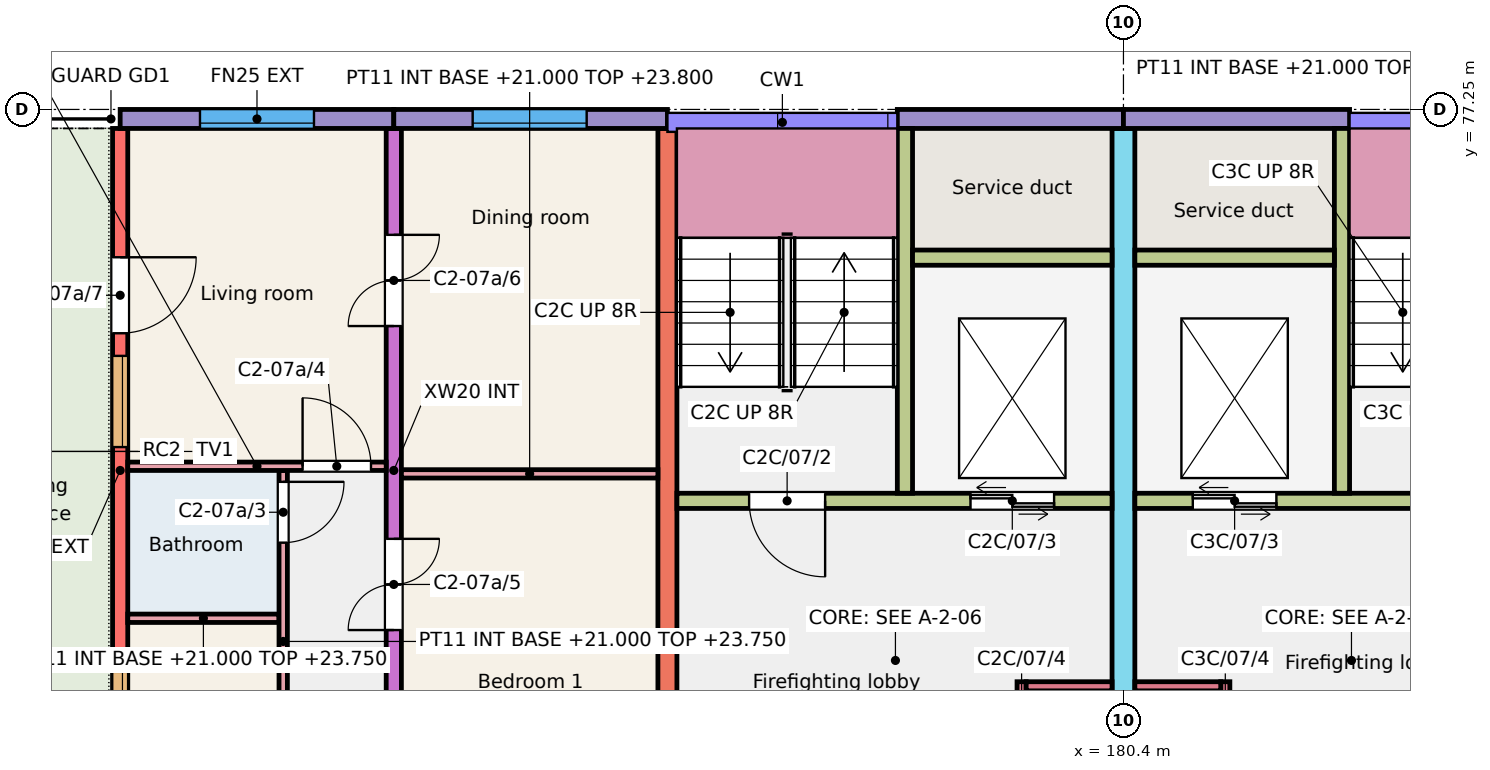
"""IFC4 building model, lengths in metres.
Left out: names, types, materials, properties, quantities, classifications, styles, units other than length and angle.
Written with IfcOpenShell. Run it as: python <this file> out.ifc"""

import sys

from ifc_helpers import new_model, si_unit, direction, frame, frame_2d, origin, place, context, subcontext, project, spatial, rectangle, extrude, element, fill, save


model = new_model("IFC4")
c1 = context("Model", 3, precision=1e-05, world=origin(), true_north=direction((0.0, 1.0)))
c2 = subcontext(c1, "Body", "Model", "MODEL_VIEW")
j1 = project(units=[si_unit("LENGTHUNIT", "METRE"), si_unit("PLANEANGLEUNIT", "RADIAN")], contexts=[c1])
p1 = place(None, origin())
s1 = spatial("IfcSite", under=j1, at=p1, CompositionType="ELEMENT")
p2 = place(p1, origin())
s2 = spatial("IfcBuilding", under=s1, at=p2, CompositionType="ELEMENT")
p3 = place(p2, frame((0.0, 0.0, 21.0)))
s3 = spatial("IfcBuildingStorey", under=s2, at=p3, CompositionType="ELEMENT", Elevation=21.0)
p4 = place(p3, frame((167.2, 68.0, 0.0), z_axis=(0.0, 0.0, 1.0), x_axis=(0.0, 1.0, 0.0)))
e1 = element("IfcWall", 1, at=p4, inside=s3, PredefinedType="SHEAR", context=c2, shape_type="SweptSolid", body=[
    extrude(rectangle(XDim=9.0, YDim=0.2, at=frame_2d((4.5, 0.0))), origin(), (0.0, 0.0, 1.0), 3.0),
])
p5 = place(p4, frame((0.65, 0.0, 0.9)))
e2 = element("IfcOpeningElement", 2, at=p5, cuts=e1, PredefinedType="OPENING", context=c2, shape_type="SweptSolid", body=[
    extrude(rectangle(XDim=1.2, YDim=1.5, at=frame_2d((0.6, 0.75))), frame((0.0, 0.11, 0.0), z_axis=(0.0, -1.0, 0.0), x_axis=(1.0, 0.0, 0.0)), (0.0, 0.0, 1.0), 0.22),
])
p6 = place(p4, frame((4.808, 0.0, 0.9)))
e3 = element("IfcOpeningElement", 3, at=p6, cuts=e1, PredefinedType="OPENING", context=c2, shape_type="SweptSolid", body=[
    extrude(rectangle(XDim=1.2, YDim=1.5, at=frame_2d((0.6, 0.75))), frame((0.0, 0.11, 0.0), z_axis=(0.0, -1.0, 0.0), x_axis=(1.0, 0.0, 0.0)), (0.0, 0.0, 1.0), 0.22),
])
p7 = place(p4, frame((6.305, 0.0, 0.0)))
e4 = element("IfcOpeningElement", 4, at=p7, cuts=e1, PredefinedType="OPENING", context=c2, shape_type="SweptSolid", body=[
    extrude(rectangle(XDim=1.0, YDim=2.1, at=frame_2d((0.5, 1.05))), frame((0.0, 0.11, 0.0), z_axis=(0.0, -1.0, 0.0), x_axis=(1.0, 0.0, 0.0)), (0.0, 0.0, 1.0), 0.22),
])
p8 = place(p3, frame((170.8, 68.0, 0.0), z_axis=(0.0, 0.0, 1.0), x_axis=(0.0, 1.0, 0.0)))
e5 = element("IfcWall", 5, at=p8, inside=s3, PredefinedType="SHEAR", context=c2, shape_type="SweptSolid", body=[
    extrude(rectangle(XDim=9.0, YDim=0.2, at=frame_2d((4.5, 0.0))), origin(), (0.0, 0.0, 1.0), 3.0),
])
p9 = place(p8, frame((2.4, 0.0, 0.0)))
e6 = element("IfcOpeningElement", 6, at=p9, cuts=e5, PredefinedType="OPENING", context=c2, shape_type="SweptSolid", body=[
    extrude(rectangle(XDim=1.2, YDim=2.1, at=frame_2d((0.6, 1.05))), frame((0.0, 0.11, 0.0), z_axis=(0.0, -1.0, 0.0), x_axis=(1.0, 0.0, 0.0)), (0.0, 0.0, 1.0), 0.22),
])
p10 = place(p8, frame((6.4, 0.0, 0.0)))
e7 = element("IfcOpeningElement", 7, at=p10, cuts=e5, PredefinedType="OPENING", context=c2, shape_type="SweptSolid", body=[
    extrude(rectangle(XDim=1.2, YDim=2.1, at=frame_2d((0.6, 1.05))), frame((0.0, 0.11, 0.0), z_axis=(0.0, -1.0, 0.0), x_axis=(1.0, 0.0, 0.0)), (0.0, 0.0, 1.0), 0.22),
])
p11 = place(p3, frame((174.4, 68.0, 0.0), z_axis=(0.0, 0.0, 1.0), x_axis=(0.0, 1.0, 0.0)))
e8 = element("IfcWall", 8, at=p11, inside=s3, PredefinedType="SHEAR", context=c2, shape_type="SweptSolid", body=[
    extrude(rectangle(XDim=9.0, YDim=0.25, at=frame_2d((4.5, 0.0))), origin(), (0.0, 0.0, 1.0), 3.0),
])
p12 = place(p3, frame((180.4, 66.0, 0.0), z_axis=(0.0, 0.0, 1.0), x_axis=(0.0, 1.0, 0.0)))
e9 = element("IfcWall", 9, at=p12, inside=s3, PredefinedType="SHEAR", context=c2, shape_type="SweptSolid", body=[
    extrude(rectangle(XDim=11.0, YDim=0.3, at=frame_2d((5.5, 0.0))), origin(), (0.0, 0.0, 1.0), 3.0),
])
p13 = place(p12, frame((0.3, 0.0, 0.0)))
e10 = element("IfcOpeningElement", 10, at=p13, cuts=e9, PredefinedType="OPENING", context=c2, shape_type="SweptSolid", body=[
    extrude(rectangle(XDim=1.2, YDim=2.1, at=frame_2d((0.6, 1.05))), frame((0.0, 0.16, 0.0), z_axis=(0.0, -1.0, 0.0), x_axis=(1.0, 0.0, 0.0)), (0.0, 0.0, 1.0), 0.32),
])
p14 = place(p3, frame((167.2, 77.125, 0.0), z_axis=(0.0, 0.0, 1.0), x_axis=(1.0, 0.0, 0.0)))
e11 = element("IfcWall", 11, at=p14, inside=s3, PredefinedType="SOLIDWALL", context=c2, shape_type="SweptSolid", body=[
    extrude(rectangle(XDim=3.6, YDim=0.25, at=frame_2d((1.8, 0.0))), origin(), (0.0, 0.0, 1.0), 3.0),
])
p15 = place(p14, frame((1.05, 0.0, 0.9)))
e12 = element("IfcOpeningElement", 12, at=p15, cuts=e11, PredefinedType="OPENING", context=c2, shape_type="SweptSolid", body=[
    extrude(rectangle(XDim=1.5, YDim=1.5, at=frame_2d((0.75, 0.75))), frame((0.0, 0.135, 0.0), z_axis=(0.0, -1.0, 0.0), x_axis=(1.0, 0.0, 0.0)), (0.0, 0.0, 1.0), 0.27),
])
p16 = place(p3, frame((170.8, 77.125, 0.0), z_axis=(0.0, 0.0, 1.0), x_axis=(1.0, 0.0, 0.0)))
e13 = element("IfcWall", 13, at=p16, inside=s3, PredefinedType="SOLIDWALL", context=c2, shape_type="SweptSolid", body=[
    extrude(rectangle(XDim=3.6, YDim=0.25, at=frame_2d((1.8, 0.0))), origin(), (0.0, 0.0, 1.0), 3.0),
])
p17 = place(p16, frame((1.038, 0.0, 0.9)))
e14 = element("IfcOpeningElement", 14, at=p17, cuts=e13, PredefinedType="OPENING", context=c2, shape_type="SweptSolid", body=[
    extrude(rectangle(XDim=1.5, YDim=1.5, at=frame_2d((0.75, 0.75))), frame((0.0, 0.135, 0.0), z_axis=(0.0, -1.0, 0.0), x_axis=(1.0, 0.0, 0.0)), (0.0, 0.0, 1.0), 0.27),
])
p18 = place(p3, frame((177.425, 77.125, 0.0), z_axis=(0.0, 0.0, 1.0), x_axis=(1.0, 0.0, 0.0)))
e15 = element("IfcWall", 15, at=p18, inside=s3, PredefinedType="SOLIDWALL", context=c2, shape_type="SweptSolid", body=[
    extrude(rectangle(XDim=2.975, YDim=0.25, at=frame_2d((1.487, 0.0))), origin(), (0.0, 0.0, 1.0), 3.0),
])
p19 = place(p3, frame((174.525, 72.1, 0.0), z_axis=(0.0, 0.0, 1.0), x_axis=(1.0, 0.0, 0.0)))
e16 = element("IfcWall", 16, at=p19, inside=s3, PredefinedType="SHEAR", context=c2, shape_type="SweptSolid", body=[
    extrude(rectangle(XDim=5.725, YDim=0.2, at=frame_2d((2.863, 0.0))), origin(), (0.0, 0.0, 1.0), 3.0),
])
p20 = place(p19, frame((0.95, 0.0, 0.0)))
e17 = element("IfcOpeningElement", 17, at=p20, cuts=e16, PredefinedType="OPENING", context=c2, shape_type="SweptSolid", body=[
    extrude(rectangle(XDim=1.0, YDim=2.1, at=frame_2d((0.5, 1.05))), frame((0.0, 0.11, 0.0), z_axis=(0.0, -1.0, 0.0), x_axis=(1.0, 0.0, 0.0)), (0.0, 0.0, 1.0), 0.22),
])
p21 = place(p19, frame((3.863, 0.0, 0.0)))
e18 = element("IfcOpeningElement", 18, at=p21, cuts=e16, PredefinedType="OPENING", context=c2, shape_type="SweptSolid", body=[
    extrude(rectangle(XDim=1.1, YDim=2.1, at=frame_2d((0.55, 1.05))), frame((0.0, 0.11, 0.0), z_axis=(0.0, -1.0, 0.0), x_axis=(1.0, 0.0, 0.0)), (0.0, 0.0, 1.0), 0.22),
])
p22 = place(p3, frame((177.525, 72.2, 0.0), z_axis=(0.0, 0.0, 1.0), x_axis=(0.0, 1.0, 0.0)))
e19 = element("IfcWall", 19, at=p22, inside=s3, PredefinedType="SHEAR", context=c2, shape_type="SweptSolid", body=[
    extrude(rectangle(XDim=4.8, YDim=0.2, at=frame_2d((2.4, 0.0))), origin(), (0.0, 0.0, 1.0), 3.0),
])
p23 = place(p3, frame((177.625, 75.3, 0.0), z_axis=(0.0, 0.0, 1.0), x_axis=(1.0, 0.0, 0.0)))
e20 = element("IfcWall", 20, at=p23, inside=s3, PredefinedType="SHEAR", context=c2, shape_type="SweptSolid", body=[
    extrude(rectangle(XDim=2.625, YDim=0.2, at=frame_2d((1.312, 0.0))), origin(), (0.0, 0.0, 1.0), 3.0),
])
p24 = place(p3, frame((179.06, 68.0, 0.0), z_axis=(0.0, 0.0, 1.0), x_axis=(0.0, 1.0, 0.0)))
e21 = element("IfcWall", 21, at=p24, inside=s3, PredefinedType="SHEAR", context=c2, shape_type="SweptSolid", body=[
    extrude(rectangle(XDim=1.72, YDim=0.12, at=frame_2d((0.86, 0.0))), origin(), (0.0, 0.0, 1.0), 3.0),
])
p25 = place(p24, frame((0.45, 0.0, 0.0)))
e22 = element("IfcOpeningElement", 22, at=p25, cuts=e21, PredefinedType="OPENING", context=c2, shape_type="SweptSolid", body=[
    extrude(rectangle(XDim=0.9, YDim=2.1, at=frame_2d((0.45, 1.05))), frame((0.0, 0.07, 0.0), z_axis=(0.0, -1.0, 0.0), x_axis=(1.0, 0.0, 0.0)), (0.0, 0.0, 1.0), 0.14),
])
p26 = place(p3, frame((179.12, 69.66, 0.0), z_axis=(0.0, 0.0, 1.0), x_axis=(1.0, 0.0, 0.0)))
e23 = element("IfcWall", 23, at=p26, inside=s3, PredefinedType="SHEAR", context=c2, shape_type="SweptSolid", body=[
    extrude(rectangle(XDim=1.13, YDim=0.12, at=frame_2d((0.565, 0.0))), origin(), (0.0, 0.0, 1.0), 3.0),
])
p27 = place(p3, frame((180.4, 77.125, 0.0), z_axis=(0.0, 0.0, 1.0), x_axis=(1.0, 0.0, 0.0)))
e24 = element("IfcWall", 24, at=p27, inside=s3, PredefinedType="SOLIDWALL", context=c2, shape_type="SweptSolid", body=[
    extrude(rectangle(XDim=2.975, YDim=0.25, at=frame_2d((1.488, 0.0))), origin(), (0.0, 0.0, 1.0), 3.0),
])
p28 = place(p3, frame((180.55, 72.1, 0.0), z_axis=(0.0, 0.0, 1.0), x_axis=(1.0, 0.0, 0.0)))
e25 = element("IfcWall", 25, at=p28, inside=s3, PredefinedType="SHEAR", context=c2, shape_type="SweptSolid", body=[
    extrude(rectangle(XDim=5.725, YDim=0.2, at=frame_2d((2.862, 0.0))), origin(), (0.0, 0.0, 1.0), 3.0),
])
p29 = place(p28, frame((3.775, 0.0, 0.0)))
e26 = element("IfcOpeningElement", 26, at=p29, cuts=e25, PredefinedType="OPENING", context=c2, shape_type="SweptSolid", body=[
    extrude(rectangle(XDim=1.0, YDim=2.1, at=frame_2d((0.5, 1.05))), frame((0.0, 0.11, 0.0), z_axis=(0.0, -1.0, 0.0), x_axis=(1.0, 0.0, 0.0)), (0.0, 0.0, 1.0), 0.22),
])
p30 = place(p28, frame((0.762, 0.0, 0.0)))
e27 = element("IfcOpeningElement", 27, at=p30, cuts=e25, PredefinedType="OPENING", context=c2, shape_type="SweptSolid", body=[
    extrude(rectangle(XDim=1.1, YDim=2.1, at=frame_2d((0.55, 1.05))), frame((0.0, 0.11, 0.0), z_axis=(0.0, -1.0, 0.0), x_axis=(1.0, 0.0, 0.0)), (0.0, 0.0, 1.0), 0.22),
])
p31 = place(p3, frame((183.275, 72.2, 0.0), z_axis=(0.0, 0.0, 1.0), x_axis=(0.0, 1.0, 0.0)))
e28 = element("IfcWall", 28, at=p31, inside=s3, PredefinedType="SHEAR", context=c2, shape_type="SweptSolid", body=[
    extrude(rectangle(XDim=4.8, YDim=0.2, at=frame_2d((2.4, 0.0))), origin(), (0.0, 0.0, 1.0), 3.0),
])
p32 = place(p3, frame((180.55, 75.3, 0.0), z_axis=(0.0, 0.0, 1.0), x_axis=(1.0, 0.0, 0.0)))
e29 = element("IfcWall", 29, at=p32, inside=s3, PredefinedType="SHEAR", context=c2, shape_type="SweptSolid", body=[
    extrude(rectangle(XDim=2.625, YDim=0.2, at=frame_2d((1.312, 0.0))), origin(), (0.0, 0.0, 1.0), 3.0),
])
p33 = place(p3, frame((181.74, 68.0, 0.0), z_axis=(0.0, 0.0, 1.0), x_axis=(0.0, 1.0, 0.0)))
e30 = element("IfcWall", 30, at=p33, inside=s3, PredefinedType="SHEAR", context=c2, shape_type="SweptSolid", body=[
    extrude(rectangle(XDim=1.72, YDim=0.12, at=frame_2d((0.86, 0.0))), origin(), (0.0, 0.0, 1.0), 3.0),
])
p34 = place(p33, frame((0.45, 0.0, 0.0)))
e31 = element("IfcOpeningElement", 31, at=p34, cuts=e30, PredefinedType="OPENING", context=c2, shape_type="SweptSolid", body=[
    extrude(rectangle(XDim=0.9, YDim=2.1, at=frame_2d((0.45, 1.05))), frame((0.0, 0.07, 0.0), z_axis=(0.0, -1.0, 0.0), x_axis=(1.0, 0.0, 0.0)), (0.0, 0.0, 1.0), 0.14),
])
p35 = place(p3, frame((180.55, 69.66, 0.0), z_axis=(0.0, 0.0, 1.0), x_axis=(1.0, 0.0, 0.0)))
e32 = element("IfcWall", 32, at=p35, inside=s3, PredefinedType="SHEAR", context=c2, shape_type="SweptSolid", body=[
    extrude(rectangle(XDim=1.13, YDim=0.12, at=frame_2d((0.565, 0.0))), origin(), (0.0, 0.0, 1.0), 3.0),
])
p36 = place(p3, frame((167.3, 70.555, 0.0), z_axis=(0.0, 0.0, 1.0), x_axis=(1.0, 0.0, 0.0)))
e33 = element("IfcWall", 33, at=p36, inside=s3, PredefinedType="PARTITIONING", context=c2, shape_type="SweptSolid", body=[
    extrude(rectangle(XDim=1.99, YDim=0.11, at=frame_2d((0.995, 0.0))), origin(), (0.0, 0.0, 1.0), 2.75),
])
p37 = place(p3, frame((169.345, 68.0, 0.0), z_axis=(0.0, 0.0, 1.0), x_axis=(0.0, 1.0, 0.0)))
e34 = element("IfcWall", 34, at=p37, inside=s3, PredefinedType="PARTITIONING", context=c2, shape_type="SweptSolid", body=[
    extrude(rectangle(XDim=4.5, YDim=0.11, at=frame_2d((2.25, 0.0))), origin(), (0.0, 0.0, 1.0), 2.75),
])
p38 = place(p37, frame((0.2, 0.0, 0.0)))
e35 = element("IfcOpeningElement", 35, at=p38, cuts=e34, PredefinedType="OPENING", context=c2, shape_type="SweptSolid", body=[
    extrude(rectangle(XDim=0.8, YDim=2.1, at=frame_2d((0.4, 1.05))), frame((0.0, 0.065, 0.0), z_axis=(0.0, -1.0, 0.0), x_axis=(1.0, 0.0, 0.0)), (0.0, 0.0, 1.0), 0.13),
])
p39 = place(p37, frame((3.55, 0.0, 0.0)))
e36 = element("IfcOpeningElement", 36, at=p39, cuts=e34, PredefinedType="OPENING", context=c2, shape_type="SweptSolid", body=[
    extrude(rectangle(XDim=0.8, YDim=2.1, at=frame_2d((0.4, 1.05))), frame((0.0, 0.065, 0.0), z_axis=(0.0, -1.0, 0.0), x_axis=(1.0, 0.0, 0.0)), (0.0, 0.0, 1.0), 0.13),
])
p40 = place(p3, frame((167.3, 72.555, 0.0), z_axis=(0.0, 0.0, 1.0), x_axis=(1.0, 0.0, 0.0)))
e37 = element("IfcWall", 37, at=p40, inside=s3, PredefinedType="PARTITIONING", context=c2, shape_type="SweptSolid", body=[
    extrude(rectangle(XDim=3.4, YDim=0.11, at=frame_2d((1.7, 0.0))), origin(), (0.0, 0.0, 1.0), 2.75),
])
p41 = place(p40, frame((2.3, 0.0, 0.0)))
e38 = element("IfcOpeningElement", 38, at=p41, cuts=e37, PredefinedType="OPENING", context=c2, shape_type="SweptSolid", body=[
    extrude(rectangle(XDim=0.9, YDim=2.1, at=frame_2d((0.45, 1.05))), frame((0.0, 0.065, 0.0), z_axis=(0.0, -1.0, 0.0), x_axis=(1.0, 0.0, 0.0)), (0.0, 0.0, 1.0), 0.13),
])
p42 = place(p3, frame((170.9, 72.455, 0.0), z_axis=(0.0, 0.0, 1.0), x_axis=(1.0, 0.0, 0.0)))
e39 = element("IfcWall", 39, at=p42, inside=s3, PredefinedType="PARTITIONING", context=c2, shape_type="SweptSolid", body=[
    extrude(rectangle(XDim=3.375, YDim=0.11, at=frame_2d((1.688, 0.0))), origin(), (0.0, 0.0, 1.0), 2.8),
])
p43 = place(p17, origin())
e40 = element("IfcWindow", 40, at=p43, inside=s3, PartitioningType="SINGLE_PANEL", PredefinedType="WINDOW", context=c2, shape_type="SweptSolid", body=[
    extrude(rectangle(XDim=1.5, YDim=1.5, at=frame_2d((0.75, 0.75))), frame((0.0, -0.025, 0.0), z_axis=(0.0, -1.0, 0.0), x_axis=(1.0, 0.0, 0.0)), (0.0, 0.0, 1.0), 0.06),
])
fill(e14, e40)
p44 = place(p15, origin())
e41 = element("IfcWindow", 41, at=p44, inside=s3, PartitioningType="SINGLE_PANEL", PredefinedType="WINDOW", context=c2, shape_type="SweptSolid", body=[
    extrude(rectangle(XDim=1.5, YDim=1.5, at=frame_2d((0.75, 0.75))), frame((0.0, -0.025, 0.0), z_axis=(0.0, -1.0, 0.0), x_axis=(1.0, 0.0, 0.0)), (0.0, 0.0, 1.0), 0.06),
])
fill(e12, e41)
p45 = place(p5, origin())
e42 = element("IfcWindow", 42, at=p45, inside=s3, PartitioningType="SINGLE_PANEL", PredefinedType="WINDOW", context=c2, shape_type="SweptSolid", body=[
    extrude(rectangle(XDim=1.2, YDim=1.5, at=frame_2d((0.6, 0.75))), frame((0.0, 0.0, 0.0), z_axis=(0.0, -1.0, 0.0), x_axis=(1.0, 0.0, 0.0)), (0.0, 0.0, 1.0), 0.06),
])
fill(e2, e42)
p46 = place(p6, origin())
e43 = element("IfcWindow", 43, at=p46, inside=s3, PartitioningType="SINGLE_PANEL", PredefinedType="WINDOW", context=c2, shape_type="SweptSolid", body=[
    extrude(rectangle(XDim=1.2, YDim=1.5, at=frame_2d((0.6, 0.75))), frame((0.0, 0.0, 0.0), z_axis=(0.0, -1.0, 0.0), x_axis=(1.0, 0.0, 0.0)), (0.0, 0.0, 1.0), 0.06),
])
fill(e3, e43)
p47 = place(p39, origin())
e44 = element("IfcDoor", 44, at=p47, inside=s3, OperationType="SINGLE_SWING_RIGHT", PredefinedType="DOOR", context=c2, shape_type="SweptSolid", body=[
    extrude(rectangle(XDim=0.8, YDim=2.1, at=frame_2d((0.4, 1.05))), frame((0.0, 0.025, 0.0), z_axis=(0.0, -1.0, 0.0), x_axis=(1.0, 0.0, 0.0)), (0.0, 0.0, 1.0), 0.05),
])
fill(e36, e44)
p48 = place(p41, origin())
e45 = element("IfcDoor", 45, at=p48, inside=s3, OperationType="SINGLE_SWING_LEFT", PredefinedType="DOOR", context=c2, shape_type="SweptSolid", body=[
    extrude(rectangle(XDim=0.9, YDim=2.1, at=frame_2d((0.45, 1.05))), frame((0.0, 0.025, 0.0), z_axis=(0.0, -1.0, 0.0), x_axis=(1.0, 0.0, 0.0)), (0.0, 0.0, 1.0), 0.05),
])
fill(e38, e45)
p49 = place(p9, origin())
e46 = element("IfcDoor", 46, at=p49, inside=s3, OperationType="DOUBLE_DOOR_SINGLE_SWING", PredefinedType="DOOR", context=c2, shape_type="SweptSolid", body=[
    extrude(rectangle(XDim=1.2, YDim=2.1, at=frame_2d((0.6, 1.05))), frame((0.0, 0.025, 0.0), z_axis=(0.0, -1.0, 0.0), x_axis=(1.0, 0.0, 0.0)), (0.0, 0.0, 1.0), 0.05),
])
fill(e6, e46)
p50 = place(p10, origin())
e47 = element("IfcDoor", 47, at=p50, inside=s3, OperationType="DOUBLE_DOOR_SINGLE_SWING", PredefinedType="DOOR", context=c2, shape_type="SweptSolid", body=[
    extrude(rectangle(XDim=1.2, YDim=2.1, at=frame_2d((0.6, 1.05))), frame((0.0, 0.025, 0.0), z_axis=(0.0, -1.0, 0.0), x_axis=(1.0, 0.0, 0.0)), (0.0, 0.0, 1.0), 0.05),
])
fill(e7, e47)
p51 = place(p7, origin())
e48 = element("IfcDoor", 48, at=p51, inside=s3, OperationType="SINGLE_SWING_RIGHT", PredefinedType="DOOR", context=c2, shape_type="SweptSolid", body=[
    extrude(rectangle(XDim=1.0, YDim=2.1, at=frame_2d((0.5, 1.05))), frame((0.0, 0.025, 0.0), z_axis=(0.0, -1.0, 0.0), x_axis=(1.0, 0.0, 0.0)), (0.0, 0.0, 1.0), 0.05),
])
fill(e4, e48)
p52 = place(p20, origin())
e49 = element("IfcDoor", 49, at=p52, inside=s3, OperationType="SINGLE_SWING_RIGHT", PredefinedType="DOOR", context=c2, shape_type="SweptSolid", body=[
    extrude(rectangle(XDim=1.0, YDim=2.1, at=frame_2d((0.5, 1.05))), frame((0.0, 0.025, 0.0), z_axis=(0.0, -1.0, 0.0), x_axis=(1.0, 0.0, 0.0)), (0.0, 0.0, 1.0), 0.05),
])
fill(e17, e49)
p53 = place(p21, origin())
e50 = element("IfcDoor", 50, at=p53, inside=s3, OperationType="DOUBLE_DOOR_SLIDING", PredefinedType="DOOR", context=c2, shape_type="SweptSolid", body=[
    extrude(rectangle(XDim=1.1, YDim=2.1, at=frame_2d((0.55, 1.05))), frame((0.0, 0.025, 0.0), z_axis=(0.0, -1.0, 0.0), x_axis=(1.0, 0.0, 0.0)), (0.0, 0.0, 1.0), 0.05),
])
fill(e18, e50)
p54 = place(p30, origin())
e51 = element("IfcDoor", 51, at=p54, inside=s3, OperationType="DOUBLE_DOOR_SLIDING", PredefinedType="DOOR", context=c2, shape_type="SweptSolid", body=[
    extrude(rectangle(XDim=1.1, YDim=2.1, at=frame_2d((0.55, 1.05))), frame((0.0, 0.025, 0.0), z_axis=(0.0, -1.0, 0.0), x_axis=(1.0, 0.0, 0.0)), (0.0, 0.0, 1.0), 0.05),
])
fill(e27, e51)
save(model, sys.argv[1])
